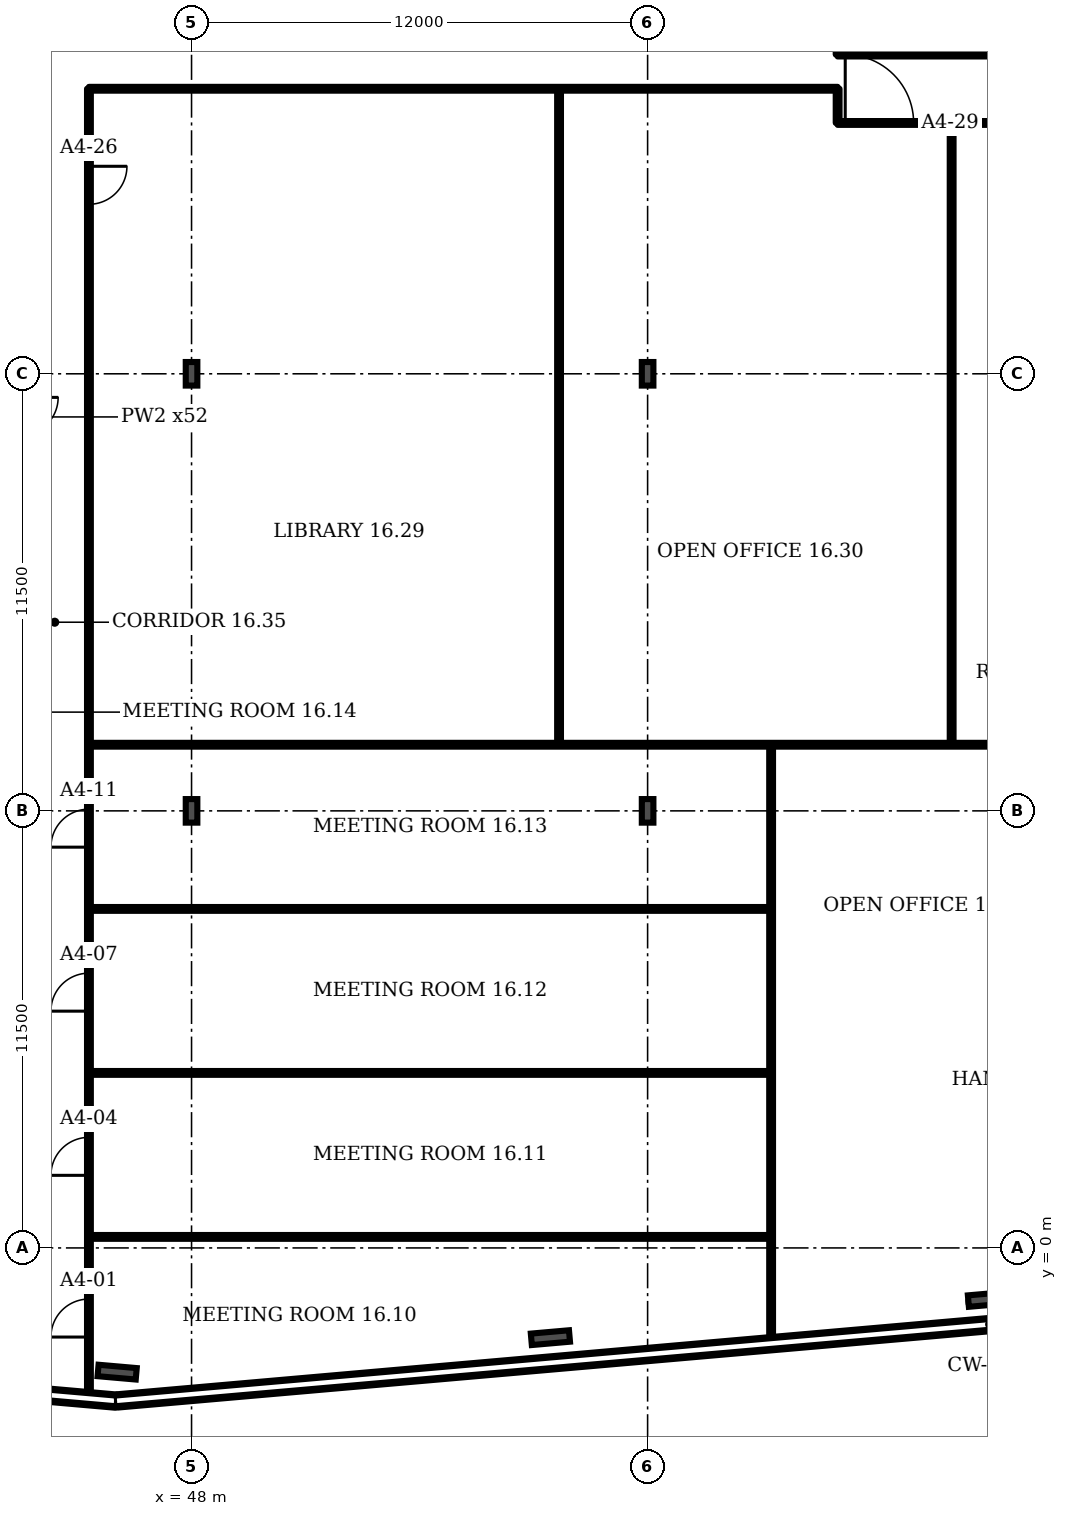
"""IFC4 building model, lengths in metres.
Left out: names, types, materials, properties, quantities, classifications, styles, units other than length and angle.
Written with IfcOpenShell. Run it as: python <this file> out.ifc"""

import sys

from ifc_helpers import new_model, si_unit, direction, frame, frame_2d, origin, origin_2d, place, context, subcontext, project, spatial, rectangle, i_section, extrude, element, fill, save


model = new_model("IFC4")
c1 = context("Model", 3, precision=1e-05, world=origin(), true_north=direction((0.0, 1.0)))
c2 = subcontext(c1, "Body", "Model", "MODEL_VIEW")
j1 = project(units=[si_unit("LENGTHUNIT", "METRE"), si_unit("PLANEANGLEUNIT", "RADIAN")], contexts=[c1])
p1 = place(None, origin())
s1 = spatial("IfcSite", under=j1, at=p1, CompositionType="ELEMENT")
p2 = place(p1, origin())
s2 = spatial("IfcBuilding", under=s1, at=p2, CompositionType="ELEMENT")
p3 = place(p2, frame((0.0, 0.0, 77.5)))
s3 = spatial("IfcBuildingStorey", under=s2, at=p3, CompositionType="ELEMENT", Elevation=77.5)
for number, where, z_axis, x_axis in (
    (1, (46.042, -3.268, 0.0), (0.0, 0.0, 1.0), (-0.087, -0.996, 0.0)),
    (2, (57.442, -2.361, 0.0), (0.0, 0.0, 1.0), (0.087, -0.996, 0.0)),
    (3, (68.942, -1.355, 0.0), (0.0, 0.0, 1.0), (0.087, -0.996, 0.0)),
):
    element("IfcColumn", number, at=place(p3, frame(where, z_axis=z_axis, x_axis=x_axis)), inside=s3, PredefinedType="COLUMN", context=c2, shape_type="SweptSolid", body=[
        extrude(i_section(OverallWidth=0.302, OverallDepth=1.008, WebThickness=0.021, FlangeThickness=0.04, FilletRadius=0.03, at=origin_2d()), origin(), (0.0, 0.0, 1.0), 3.6),
    ])
for number, where, z_axis, x_axis in (
    (4, (48.0, 11.5, 0.0), (0.0, 0.0, 1.0), (1.0, 0.0, 0.0)),
    (5, (60.0, 11.5, 0.0), (0.0, 0.0, 1.0), (1.0, 0.0, 0.0)),
    (6, (48.0, 23.0, 0.0), (0.0, 0.0, 1.0), (1.0, 0.0, 0.0)),
    (7, (60.0, 23.0, 0.0), (0.0, 0.0, 1.0), (1.0, 0.0, 0.0)),
):
    element("IfcColumn", number, at=place(p3, frame(where, z_axis=z_axis, x_axis=x_axis)), inside=s3, PredefinedType="COLUMN", context=c2, shape_type="SweptSolid", body=[
        extrude(i_section(OverallWidth=0.305, OverallDepth=0.62, WebThickness=0.021, FlangeThickness=0.04, FilletRadius=0.027, at=origin_2d()), origin(), (0.0, 0.0, 1.0), 3.6),
    ])
p4 = place(p3, frame((34.601, -3.032, 0.0), z_axis=(0.0, 0.0, 1.0), x_axis=(0.996193, -0.087148, 0.0)))
e8 = element("IfcWall", 8, at=p4, inside=s3, PredefinedType="SOLIDWALL", context=c2, shape_type="SweptSolid", body=[
    extrude(rectangle(XDim=11.458, YDim=0.35, at=frame_2d((5.729, 0.0))), origin(), (0.0, 0.0, 1.0), 1.0),
])
p5 = place(p3, frame((46.045, -4.026, 0.0), z_axis=(0.0, 0.0, 1.0), x_axis=(0.99619, 0.087163, 0.0)))
e9 = element("IfcWall", 9, at=p5, inside=s3, PredefinedType="SOLIDWALL", context=c2, shape_type="SweptSolid", body=[
    extrude(rectangle(XDim=23.013, YDim=0.35, at=frame_2d((11.506, 0.0))), origin(), (0.0, 0.0, 1.0), 1.0),
])
p6 = place(p3, frame((45.3, -3.943, 0.0), z_axis=(0.0, 0.0, 1.0), x_axis=(0.0, 1.0, 0.0)))
e10 = element("IfcWall", 10, at=p6, inside=s3, PredefinedType="PARTITIONING", context=c2, shape_type="SweptSolid", body=[
    extrude(rectangle(XDim=34.443, YDim=0.1, at=frame_2d((17.222, 0.0))), origin(), (0.0, 0.0, 1.0), 2.58),
])
p7 = place(p6, frame((1.598, 0.0, 0.0)))
e11 = element("IfcOpeningElement", 11, at=p7, cuts=e10, PredefinedType="OPENING", context=c2, shape_type="SweptSolid", body=[
    extrude(rectangle(XDim=1.0, YDim=2.1, at=frame_2d((0.5, 1.05))), frame((0.0, 0.06, 0.0), z_axis=(0.0, -1.0, 0.0), x_axis=(1.0, 0.0, 0.0)), (0.0, 0.0, 1.0), 0.12),
])
p8 = place(p6, frame((5.853, 0.0, 0.0)))
e12 = element("IfcOpeningElement", 12, at=p8, cuts=e10, PredefinedType="OPENING", context=c2, shape_type="SweptSolid", body=[
    extrude(rectangle(XDim=1.0, YDim=2.1, at=frame_2d((0.5, 1.05))), frame((0.0, 0.06, 0.0), z_axis=(0.0, -1.0, 0.0), x_axis=(1.0, 0.0, 0.0)), (0.0, 0.0, 1.0), 0.12),
])
p9 = place(p6, frame((10.173, 0.0, 0.0)))
e13 = element("IfcOpeningElement", 13, at=p9, cuts=e10, PredefinedType="OPENING", context=c2, shape_type="SweptSolid", body=[
    extrude(rectangle(XDim=1.0, YDim=2.1, at=frame_2d((0.5, 1.05))), frame((0.0, 0.06, 0.0), z_axis=(0.0, -1.0, 0.0), x_axis=(1.0, 0.0, 0.0)), (0.0, 0.0, 1.0), 0.12),
])
p10 = place(p6, frame((14.488, 0.0, 0.0)))
e14 = element("IfcOpeningElement", 14, at=p10, cuts=e10, PredefinedType="OPENING", context=c2, shape_type="SweptSolid", body=[
    extrude(rectangle(XDim=1.0, YDim=2.1, at=frame_2d((0.5, 1.05))), frame((0.0, 0.06, 0.0), z_axis=(0.0, -1.0, 0.0), x_axis=(1.0, 0.0, 0.0)), (0.0, 0.0, 1.0), 0.12),
])
p11 = place(p6, frame((31.403, 0.0, 0.0)))
e15 = element("IfcOpeningElement", 15, at=p11, cuts=e10, PredefinedType="OPENING", context=c2, shape_type="SweptSolid", body=[
    extrude(rectangle(XDim=1.0, YDim=2.1, at=frame_2d((0.5, 1.05))), frame((0.0, 0.06, 0.0), z_axis=(0.0, -1.0, 0.0), x_axis=(1.0, 0.0, 0.0)), (0.0, 0.0, 1.0), 0.12),
])
for number, where, z_axis, x_axis in (
    (16, (45.3, 0.29, 0.0), (0.0, 0.0, 1.0), (1.0, 0.0, 0.0)),
    (17, (45.3, 4.605, 0.0), (0.0, 0.0, 1.0), (1.0, 0.0, 0.0)),
    (18, (45.3, 8.92, 0.0), (0.0, 0.0, 1.0), (1.0, 0.0, 0.0)),
):
    element("IfcWall", number, at=place(p3, frame(where, z_axis=z_axis, x_axis=x_axis)), inside=s3, PredefinedType="PARTITIONING", context=c2, shape_type="SweptSolid", body=[
        extrude(rectangle(XDim=17.95, YDim=0.1, at=frame_2d((8.975, 0.0))), origin(), (0.0, 0.0, 1.0), 3.2),
    ])
p12 = place(p3, frame((45.3, 13.24, 0.0), z_axis=(0.0, 0.0, 1.0), x_axis=(1.0, 0.0, 0.0)))
e19 = element("IfcWall", 19, at=p12, inside=s3, PredefinedType="PARTITIONING", context=c2, shape_type="SweptSolid", body=[
    extrude(rectangle(XDim=27.56, YDim=0.1, at=frame_2d((13.78, 0.0))), origin(), (0.0, 0.0, 1.0), 3.2),
])
p13 = place(p3, frame((45.3, 30.5, 0.0), z_axis=(0.0, 0.0, 1.0), x_axis=(1.0, 0.0, 0.0)))
e20 = element("IfcWall", 20, at=p13, inside=s3, PredefinedType="PARTITIONING", context=c2, shape_type="SweptSolid", body=[
    extrude(rectangle(XDim=19.7, YDim=0.1, at=frame_2d((9.85, 0.0))), origin(), (0.0, 0.0, 1.0), 3.2),
])
p14 = place(p3, frame((57.67, 13.24, 0.0), z_axis=(0.0, 0.0, 1.0), x_axis=(0.0, 1.0, 0.0)))
e21 = element("IfcWall", 21, at=p14, inside=s3, PredefinedType="PARTITIONING", context=c2, shape_type="SweptSolid", body=[
    extrude(rectangle(XDim=17.26, YDim=0.1, at=frame_2d((8.63, 0.0))), origin(), (0.0, 0.0, 1.0), 3.2),
])
p15 = place(p3, frame((63.25, -2.495, 0.0), z_axis=(0.0, 0.0, 1.0), x_axis=(0.0, 1.0, 0.0)))
e22 = element("IfcWall", 22, at=p15, inside=s3, PredefinedType="PARTITIONING", context=c2, shape_type="SweptSolid", body=[
    extrude(rectangle(XDim=15.735, YDim=0.1, at=frame_2d((7.868, 0.0))), origin(), (0.0, 0.0, 1.0), 2.58),
])
p16 = place(p3, frame((65.0, 29.6, 0.0), z_axis=(0.0, 0.0, 1.0), x_axis=(0.0, 1.0, 0.0)))
e23 = element("IfcWall", 23, at=p16, inside=s3, PredefinedType="PARTITIONING", context=c2, shape_type="SweptSolid", body=[
    extrude(rectangle(XDim=0.9, YDim=0.1, at=frame_2d((0.45, 0.0))), origin(), (0.0, 0.0, 1.0), 3.2),
])
p17 = place(p3, frame((65.0, 29.6, 0.0), z_axis=(0.0, 0.0, 1.0), x_axis=(1.0, 0.0, 0.0)))
e24 = element("IfcWall", 24, at=p17, inside=s3, PredefinedType="PARTITIONING", context=c2, shape_type="SweptSolid", body=[
    extrude(rectangle(XDim=4.425, YDim=0.1, at=frame_2d((2.212, 0.0))), origin(), (0.0, 0.0, 1.0), 3.2),
])
p18 = place(p17, frame((0.2, 0.0, 0.0)))
e25 = element("IfcOpeningElement", 25, at=p18, cuts=e24, PredefinedType="OPENING", context=c2, shape_type="SweptSolid", body=[
    extrude(rectangle(XDim=1.8, YDim=2.1, at=frame_2d((0.9, 1.05))), frame((0.0, 0.06, 0.0), z_axis=(0.0, -1.0, 0.0), x_axis=(1.0, 0.0, 0.0)), (0.0, 0.0, 1.0), 0.12),
])
p19 = place(p3, frame((65.0, 31.4, 0.0), z_axis=(0.0, 0.0, 1.0), x_axis=(0.0, 1.0, 0.0)))
e26 = element("IfcWall", 26, at=p19, inside=s3, PredefinedType="PARTITIONING", context=c2, shape_type="SweptSolid", body=[
    extrude(rectangle(XDim=2.58, YDim=0.1, at=frame_2d((1.29, 0.0))), origin(), (0.0, 0.0, 1.0), 3.2),
])
p20 = place(p19, frame((0.9, 0.0, 0.0)))
e27 = element("IfcOpeningElement", 27, at=p20, cuts=e26, PredefinedType="OPENING", context=c2, shape_type="SweptSolid", body=[
    extrude(rectangle(XDim=1.0, YDim=2.1, at=frame_2d((0.5, 1.05))), frame((0.0, 0.06, 0.0), z_axis=(0.0, -1.0, 0.0), x_axis=(1.0, 0.0, 0.0)), (0.0, 0.0, 1.0), 0.12),
])
p21 = place(p3, frame((65.0, 31.4, 0.0), z_axis=(0.0, 0.0, 1.0), x_axis=(1.0, 0.0, 0.0)))
e28 = element("IfcWall", 28, at=p21, inside=s3, PredefinedType="PARTITIONING", context=c2, shape_type="SweptSolid", body=[
    extrude(rectangle(XDim=7.81, YDim=0.1, at=frame_2d((3.905, 0.0))), origin(), (0.0, 0.0, 1.0), 3.2),
])
p22 = place(p21, frame((6.657, 0.0, 0.0)))
e29 = element("IfcOpeningElement", 29, at=p22, cuts=e28, PredefinedType="OPENING", context=c2, shape_type="SweptSolid", body=[
    extrude(rectangle(XDim=1.0, YDim=2.1, at=frame_2d((0.5, 1.05))), frame((0.0, 0.06, 0.0), z_axis=(0.0, -1.0, 0.0), x_axis=(1.0, 0.0, 0.0)), (0.0, 0.0, 1.0), 0.12),
])
p23 = place(p3, frame((68.0, 13.24, 0.0), z_axis=(0.0, 0.0, 1.0), x_axis=(0.0, 1.0, 0.0)))
e30 = element("IfcWall", 30, at=p23, inside=s3, PredefinedType="PARTITIONING", context=c2, shape_type="SweptSolid", body=[
    extrude(rectangle(XDim=16.36, YDim=0.1, at=frame_2d((8.18, 0.0))), origin(), (0.0, 0.0, 1.0), 3.2),
])
p24 = place(p3, frame((68.0, 31.4, 0.0), z_axis=(0.0, 0.0, 1.0), x_axis=(0.0, 1.0, 0.0)))
e31 = element("IfcWall", 31, at=p24, inside=s3, PredefinedType="PARTITIONING", context=c2, shape_type="SweptSolid", body=[
    extrude(rectangle(XDim=8.39, YDim=0.1, at=frame_2d((4.195, 0.0))), origin(), (0.0, 0.0, 1.0), 3.2),
])
p25 = place(p3, frame((68.445, -1.43, 0.0), z_axis=(0.0, 0.0, 1.0), x_axis=(0.996195, 0.087118, 0.0)))
e32 = element("IfcWall", 32, at=p25, inside=s3, PredefinedType="PARTITIONING", context=c2, shape_type="SweptSolid", body=[
    extrude(rectangle(XDim=2.738, YDim=0.1, at=frame_2d((1.369, 0.0))), origin(), (0.0, 0.0, 1.0), 2.58),
])
p26 = place(p7, origin())
e33 = element("IfcDoor", 33, at=p26, inside=s3, OperationType="SINGLE_SWING_LEFT", PredefinedType="DOOR", context=c2, shape_type="SweptSolid", body=[
    extrude(rectangle(XDim=1.0, YDim=2.1, at=frame_2d((0.5, 1.05))), frame((0.0, 0.025, 0.0), z_axis=(0.0, -1.0, 0.0), x_axis=(1.0, 0.0, 0.0)), (0.0, 0.0, 1.0), 0.05),
])
fill(e11, e33)
p27 = place(p8, origin())
e34 = element("IfcDoor", 34, at=p27, inside=s3, OperationType="SINGLE_SWING_LEFT", PredefinedType="DOOR", context=c2, shape_type="SweptSolid", body=[
    extrude(rectangle(XDim=1.0, YDim=2.1, at=frame_2d((0.5, 1.05))), frame((0.0, 0.025, 0.0), z_axis=(0.0, -1.0, 0.0), x_axis=(1.0, 0.0, 0.0)), (0.0, 0.0, 1.0), 0.05),
])
fill(e12, e34)
p28 = place(p9, origin())
e35 = element("IfcDoor", 35, at=p28, inside=s3, OperationType="SINGLE_SWING_LEFT", PredefinedType="DOOR", context=c2, shape_type="SweptSolid", body=[
    extrude(rectangle(XDim=1.0, YDim=2.1, at=frame_2d((0.5, 1.05))), frame((0.0, 0.025, 0.0), z_axis=(0.0, -1.0, 0.0), x_axis=(1.0, 0.0, 0.0)), (0.0, 0.0, 1.0), 0.05),
])
fill(e13, e35)
p29 = place(p10, origin())
e36 = element("IfcDoor", 36, at=p29, inside=s3, OperationType="SINGLE_SWING_LEFT", PredefinedType="DOOR", context=c2, shape_type="SweptSolid", body=[
    extrude(rectangle(XDim=1.0, YDim=2.1, at=frame_2d((0.5, 1.05))), frame((0.0, 0.025, 0.0), z_axis=(0.0, -1.0, 0.0), x_axis=(1.0, 0.0, 0.0)), (0.0, 0.0, 1.0), 0.05),
])
fill(e14, e36)
p30 = place(p11, origin())
e37 = element("IfcDoor", 37, at=p30, inside=s3, OperationType="SINGLE_SWING_RIGHT", PredefinedType="DOOR", context=c2, shape_type="SweptSolid", body=[
    extrude(rectangle(XDim=1.0, YDim=2.1, at=frame_2d((0.5, 1.05))), frame((0.0, 0.025, 0.0), z_axis=(0.0, -1.0, 0.0), x_axis=(1.0, 0.0, 0.0)), (0.0, 0.0, 1.0), 0.05),
])
fill(e15, e37)
p31 = place(p18, origin())
e38 = element("IfcDoor", 38, at=p31, inside=s3, OperationType="DOUBLE_DOOR_SINGLE_SWING", PredefinedType="DOOR", context=c2, shape_type="SweptSolid", body=[
    extrude(rectangle(XDim=1.8, YDim=2.1, at=frame_2d((0.9, 1.05))), frame((0.0, 0.025, 0.0), z_axis=(0.0, -1.0, 0.0), x_axis=(1.0, 0.0, 0.0)), (0.0, 0.0, 1.0), 0.05),
])
fill(e25, e38)
save(model, sys.argv[1])
